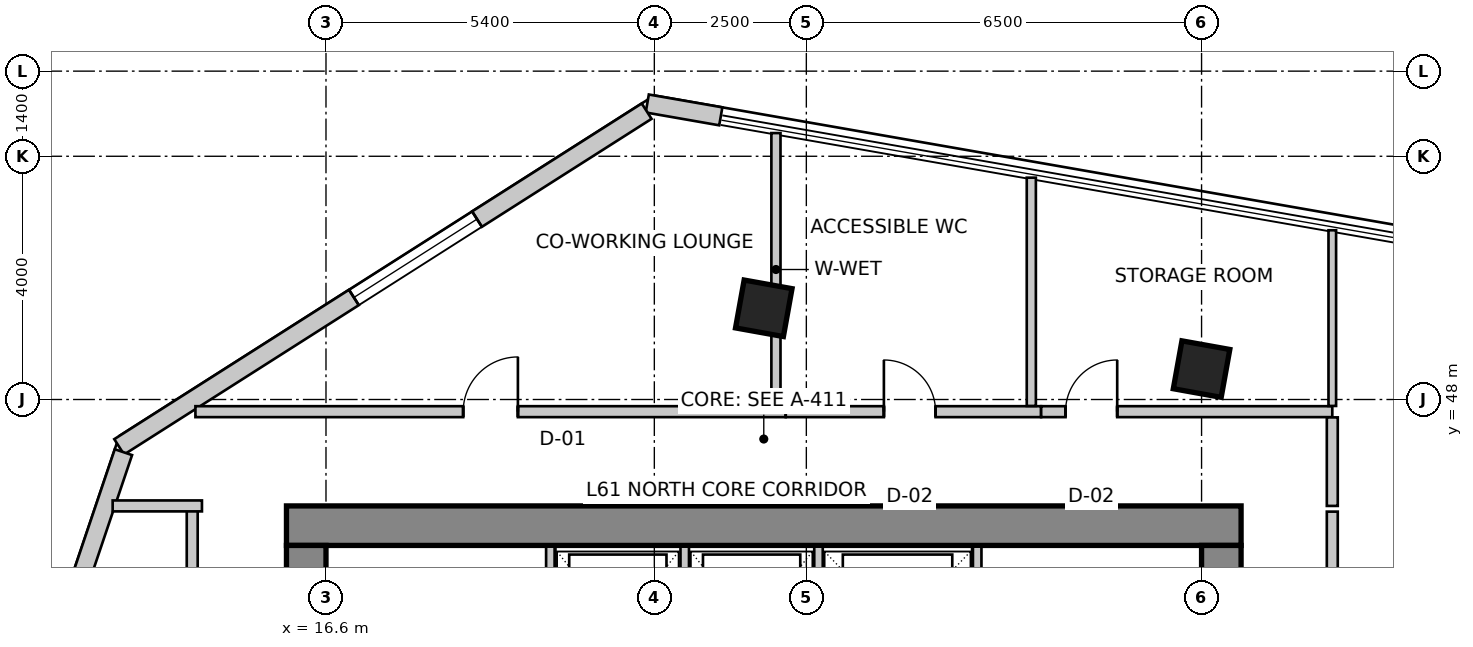
"""IFC4 building model, lengths in metres.
Left out: names, types, materials, properties, quantities, classifications, styles, units other than length and angle.
Written with IfcOpenShell. Run it as: python <this file> out.ifc"""

import sys

from ifc_helpers import new_model, si_unit, direction, frame, frame_2d, origin, origin_2d, place, context, subcontext, project, spatial, rectangle, extrude, source, transform, mapped, element, fill, save


model = new_model("IFC4")
c1 = context("Model", 3, precision=1e-05, world=origin(), true_north=direction((0.0, 1.0)))
c2 = subcontext(c1, "Body", "Model", "MODEL_VIEW")
j1 = project(units=[si_unit("LENGTHUNIT", "METRE"), si_unit("PLANEANGLEUNIT", "RADIAN")], contexts=[c1])
p1 = place(None, origin())
s1 = spatial("IfcSite", under=j1, at=p1, CompositionType="ELEMENT")
p2 = place(p1, origin())
s2 = spatial("IfcBuilding", under=s1, at=p2, CompositionType="ELEMENT")
p3 = place(p2, frame((0.0, 0.0, 239.4)))
s3 = spatial("IfcBuildingStorey", under=s2, at=p3, CompositionType="ELEMENT", Elevation=239.4)
p4 = place(p3, frame((15.95, 45.925, 0.0), z_axis=(0.0, 0.0, 1.0), x_axis=(1.0, 0.0, 0.0)))
e1 = element("IfcWall", 1, at=p4, inside=s3, PredefinedType="SHEAR", context=c2, shape_type="SweptSolid", body=[
    extrude(rectangle(XDim=15.7, YDim=0.65, at=frame_2d((7.85, 0.0))), origin(), (0.0, 0.0, 1.0), 3.5),
])
p5 = place(p3, frame((16.275, 34.2, 0.0), z_axis=(0.0, 0.0, 1.0), x_axis=(0.0, 1.0, 0.0)))
e2 = element("IfcWall", 2, at=p5, inside=s3, PredefinedType="SHEAR", context=c2, shape_type="SweptSolid", body=[
    extrude(rectangle(XDim=11.4, YDim=0.65, at=frame_2d((5.7, 0.0))), origin(), (0.0, 0.0, 1.0), 3.5),
])
m1 = source(origin(), c2, "Body", "SweptSolid", [
    extrude(rectangle(XDim=1.1, YDim=2.15, at=frame_2d((0.55, 1.075))), frame((0.0, 0.335, 0.0), z_axis=(0.0, -1.0, 0.0), x_axis=(1.0, 0.0, 0.0)), (0.0, 0.0, 1.0), 0.67),
])
p6 = place(p5, frame((7.15, 0.0, 0.0)))
e3 = element("IfcOpeningElement", 3, at=p6, cuts=e2, PredefinedType="OPENING", context=c2, shape_type="MappedRepresentation", body=[
    mapped(m1, transform((0.0, 0.0, 0.0), scale=1.0)),
])
p7 = place(p3, frame((31.325, 34.2, 0.0), z_axis=(0.0, 0.0, 1.0), x_axis=(0.0, 1.0, 0.0)))
e4 = element("IfcWall", 4, at=p7, inside=s3, PredefinedType="SHEAR", context=c2, shape_type="SweptSolid", body=[
    extrude(rectangle(XDim=11.4, YDim=0.65, at=frame_2d((5.7, 0.0))), origin(), (0.0, 0.0, 1.0), 3.5),
])
p8 = place(p7, frame((7.35, 0.0, 0.0)))
e5 = element("IfcOpeningElement", 5, at=p8, cuts=e4, PredefinedType="OPENING", context=c2, shape_type="MappedRepresentation", body=[
    mapped(m1, transform((0.0, 0.0, 0.0), scale=1.0)),
])
m2 = source(origin(), c2, "Body", "SweptSolid", [
    extrude(rectangle(XDim=0.8, YDim=0.8, at=origin_2d()), origin(), (0.0, 0.0, 1.0), 3.5),
])
for number, where, z_axis, x_axis in (
    (6, (23.8, 49.5, 0.0), (0.0, 0.0, 1.0), (0.984, -0.177, 0.0)),
    (7, (31.0, 48.5, 0.0), (0.0, 0.0, 1.0), (0.984, -0.177, 0.0)),
):
    element("IfcColumn", number, at=place(p3, frame(where, z_axis=z_axis, x_axis=x_axis)), inside=s3, PredefinedType="COLUMN", context=c2, shape_type="MappedRepresentation", body=[
        mapped(m2, transform((0.0, 0.0, 0.0), scale=1.0)),
    ])
p9 = place(p3, frame((23.093, 52.657, 0.0), z_axis=(0.0, 0.0, 1.0), x_axis=(-0.985090351288, 0.172037785961, 0.0)))
e8 = element("IfcWall", 8, at=p9, inside=s3, PredefinedType="SOLIDWALL", context=c2, shape_type="SweptSolid", body=[
    extrude(rectangle(XDim=1.228, YDim=0.3, at=frame_2d((0.614, 0.0))), origin(), (0.0, 0.0, 1.0), 3.2),
])
p10 = place(p3, frame((21.874, 52.742, 0.0), z_axis=(0.0, 0.0, 1.0), x_axis=(-0.84365659959, -0.536883173482, 0.0)))
e9 = element("IfcWall", 9, at=p10, inside=s3, PredefinedType="SOLIDWALL", context=c2, shape_type="SweptSolid", body=[
    extrude(rectangle(XDim=10.283, YDim=0.3, at=frame_2d((5.142, 0.0))), origin(), (0.0, 0.0, 1.0), 3.2),
])
m3 = source(origin(), c2, "Body", "SweptSolid", [
    extrude(rectangle(XDim=2.4, YDim=2.2, at=frame_2d((1.2, 1.1))), frame((0.0, 0.16, 0.0), z_axis=(0.0, -1.0, 0.0), x_axis=(1.0, 0.0, 0.0)), (0.0, 0.0, 1.0), 0.32),
])
p11 = place(p10, frame((3.307, 0.0, 0.85)))
e10 = element("IfcOpeningElement", 10, at=p11, cuts=e9, PredefinedType="OPENING", context=c2, shape_type="MappedRepresentation", body=[
    mapped(m3, transform((0.0, 0.0, 0.0), scale=1.0)),
])
p12 = place(p3, frame((13.269, 47.134, 0.0), z_axis=(0.0, 0.0, 1.0), x_axis=(-0.319920776449, -0.947444297464, 0.0)))
e11 = element("IfcWall", 11, at=p12, inside=s3, PredefinedType="SOLIDWALL", context=c2, shape_type="SweptSolid", body=[
    extrude(rectangle(XDim=16.133, YDim=0.3, at=frame_2d((8.067, 0.0))), origin(), (0.0, 0.0, 1.0), 3.2),
])
m4 = source(origin(), c2, "Body", "SweptSolid", [
    extrude(rectangle(XDim=2.1, YDim=2.0, at=frame_2d((1.05, 1.0))), frame((0.0, 0.16, 0.0), z_axis=(0.0, -1.0, 0.0), x_axis=(1.0, 0.0, 0.0)), (0.0, 0.0, 1.0), 0.32),
])
p13 = place(p12, frame((2.513, 0.0, 0.85)))
e12 = element("IfcOpeningElement", 12, at=p13, cuts=e11, PredefinedType="OPENING", context=c2, shape_type="MappedRepresentation", body=[
    mapped(m4, transform((0.0, 0.0, 0.0), scale=1.0)),
])
p14 = place(p12, frame((7.26, 0.0, 0.85)))
e13 = element("IfcOpeningElement", 13, at=p14, cuts=e11, PredefinedType="OPENING", context=c2, shape_type="MappedRepresentation", body=[
    mapped(m3, transform((0.0, 0.0, 0.0), scale=1.0)),
])
p15 = place(p12, frame((12.307, 0.0, 0.85)))
e14 = element("IfcOpeningElement", 14, at=p15, cuts=e11, PredefinedType="OPENING", context=c2, shape_type="MappedRepresentation", body=[
    mapped(m4, transform((0.0, 0.0, 0.0), scale=1.0)),
])
for number, where, z_axis, x_axis in (
    (15, (20.29, 43.28, 0.0), (0.0, 0.0, 1.0), (0.0, 1.0, 0.0)),
    (16, (27.31, 43.28, 0.0), (0.0, 0.0, 1.0), (0.0, 1.0, 0.0)),
):
    element("IfcWall", number, at=place(p3, frame(where, z_axis=z_axis, x_axis=x_axis)), inside=s3, PredefinedType="SOLIDWALL", context=c2, shape_type="SweptSolid", body=[
        extrude(rectangle(XDim=2.3, YDim=0.14, at=frame_2d((1.15, 0.0))), origin(), (0.0, 0.0, 1.0), 3.2),
    ])
for number, where, z_axis, x_axis in (
    (17, (22.5, 43.02, 0.0), (0.0, 0.0, 1.0), (0.0, 1.0, 0.0)),
    (18, (24.7, 43.02, 0.0), (0.0, 0.0, 1.0), (0.0, 1.0, 0.0)),
):
    element("IfcWall", number, at=place(p3, frame(where, z_axis=z_axis, x_axis=x_axis)), inside=s3, PredefinedType="SOLIDWALL", context=c2, shape_type="SweptSolid", body=[
        extrude(rectangle(XDim=2.56, YDim=0.14, at=frame_2d((1.28, 0.0))), origin(), (0.0, 0.0, 1.0), 3.2),
    ])
p16 = place(p3, frame((14.4, 33.644, 0.0), z_axis=(0.0, 0.0, 1.0), x_axis=(0.0, 1.0, 0.0)))
e19 = element("IfcWall", 19, at=p16, inside=s3, PredefinedType="PARTITIONING", context=c2, shape_type="SweptSolid", body=[
    extrude(rectangle(XDim=12.606, YDim=0.18, at=frame_2d((6.303, 0.0))), origin(), (0.0, 0.0, 1.0), 3.2),
])
m5 = source(origin(), c2, "Body", "SweptSolid", [
    extrude(rectangle(XDim=0.9, YDim=2.15, at=frame_2d((0.45, 1.075))), frame((0.0, 0.1, 0.0), z_axis=(0.0, -1.0, 0.0), x_axis=(1.0, 0.0, 0.0)), (0.0, 0.0, 1.0), 0.2),
])
p17 = place(p16, frame((4.399, 0.0, 0.0)))
e20 = element("IfcOpeningElement", 20, at=p17, cuts=e19, PredefinedType="OPENING", context=c2, shape_type="MappedRepresentation", body=[
    mapped(m5, transform((0.0, 0.0, 0.0), scale=1.0)),
])
p18 = place(p3, frame((14.56, 46.25, 0.0), z_axis=(0.0, 0.0, 1.0), x_axis=(-1.0, 0.0, 0.0)))
e21 = element("IfcWall", 21, at=p18, inside=s3, PredefinedType="PARTITIONING", context=c2, shape_type="SweptSolid", body=[
    extrude(rectangle(XDim=1.469, YDim=0.18, at=frame_2d((0.734, 0.0))), origin(), (0.0, 0.0, 1.0), 3.2),
])
p19 = place(p3, frame((14.453, 47.8, 0.0), z_axis=(0.0, 0.0, 1.0), x_axis=(1.0, 0.0, 0.0)))
e22 = element("IfcWall", 22, at=p19, inside=s3, PredefinedType="PARTITIONING", context=c2, shape_type="SweptSolid", body=[
    extrude(rectangle(XDim=9.707, YDim=0.18, at=frame_2d((4.854, 0.0))), origin(), (0.0, 0.0, 1.0), 2.869),
])
p20 = place(p19, frame((4.404, 0.0, 0.0)))
e23 = element("IfcOpeningElement", 23, at=p20, cuts=e22, PredefinedType="OPENING", context=c2, shape_type="MappedRepresentation", body=[
    mapped(m5, transform((0.0, 0.0, 0.0), scale=1.0)),
])
p21 = place(p3, frame((24.162, 47.8, 0.0), z_axis=(0.0, 0.0, 1.0), x_axis=(1.0, 0.0, 0.0)))
e24 = element("IfcWall", 24, at=p21, inside=s3, PredefinedType="PARTITIONING", context=c2, shape_type="SweptSolid", body=[
    extrude(rectangle(XDim=4.198, YDim=0.18, at=frame_2d((2.099, 0.0))), origin(), (0.0, 0.0, 1.0), 3.2),
])
m6 = source(origin(), c2, "Body", "SweptSolid", [
    extrude(rectangle(XDim=0.85, YDim=2.15, at=frame_2d((0.425, 1.075))), frame((0.0, 0.1, 0.0), z_axis=(0.0, -1.0, 0.0), x_axis=(1.0, 0.0, 0.0)), (0.0, 0.0, 1.0), 0.2),
])
p22 = place(p21, frame((1.613, 0.0, 0.0)))
e25 = element("IfcOpeningElement", 25, at=p22, cuts=e24, PredefinedType="OPENING", context=c2, shape_type="MappedRepresentation", body=[
    mapped(m6, transform((0.0, 0.0, 0.0), scale=1.0)),
])
p23 = place(p3, frame((28.362, 47.8, 0.0), z_axis=(0.0, 0.0, 1.0), x_axis=(1.0, 0.0, 0.0)))
e26 = element("IfcWall", 26, at=p23, inside=s3, PredefinedType="PARTITIONING", context=c2, shape_type="SweptSolid", body=[
    extrude(rectangle(XDim=4.788, YDim=0.18, at=frame_2d((2.394, 0.0))), origin(), (0.0, 0.0, 1.0), 2.729),
])
p24 = place(p23, frame((0.401, 0.0, 0.0)))
e27 = element("IfcOpeningElement", 27, at=p24, cuts=e26, PredefinedType="OPENING", context=c2, shape_type="MappedRepresentation", body=[
    mapped(m6, transform((0.0, 0.0, 0.0), scale=1.0)),
])
p25 = place(p3, frame((33.15, 47.706, 0.0), z_axis=(0.0, 0.0, 1.0), x_axis=(0.0, -1.0, 0.0)))
e28 = element("IfcWall", 28, at=p25, inside=s3, PredefinedType="PARTITIONING", context=c2, shape_type="SweptSolid", body=[
    extrude(rectangle(XDim=1.456, YDim=0.18, at=frame_2d((0.728, 0.0))), origin(), (0.0, 0.0, 1.0), 2.869),
])
p26 = place(p3, frame((33.15, 46.156, 0.0), z_axis=(0.0, 0.0, 1.0), x_axis=(0.0, -1.0, 0.0)))
e29 = element("IfcWall", 29, at=p26, inside=s3, PredefinedType="PARTITIONING", context=c2, shape_type="SweptSolid", body=[
    extrude(rectangle(XDim=6.316, YDim=0.18, at=frame_2d((3.158, 0.0))), origin(), (0.0, 0.0, 1.0), 2.729),
])
p27 = place(p3, frame((24.0, 52.382, 0.0), z_axis=(0.0, 0.0, 1.0), x_axis=(0.0, -1.0, 0.0)))
e30 = element("IfcWall", 30, at=p27, inside=s3, PredefinedType="PARTITIONING", context=c2, shape_type="SweptSolid", body=[
    extrude(rectangle(XDim=4.488, YDim=0.15, at=frame_2d((2.244, 0.0))), origin(), (0.0, 0.0, 1.0), 2.492),
])
p28 = place(p3, frame((28.2, 51.648, 0.0), z_axis=(0.0, 0.0, 1.0), x_axis=(0.0, -1.0, 0.0)))
e31 = element("IfcWall", 31, at=p28, inside=s3, PredefinedType="PARTITIONING", context=c2, shape_type="SweptSolid", body=[
    extrude(rectangle(XDim=3.754, YDim=0.15, at=frame_2d((1.877, 0.0))), origin(), (0.0, 0.0, 1.0), 2.492),
])
p29 = place(p3, frame((33.15, 50.783, 0.0), z_axis=(0.0, 0.0, 1.0), x_axis=(0.0, -1.0, 0.0)))
e32 = element("IfcWall", 32, at=p29, inside=s3, PredefinedType="PARTITIONING", context=c2, shape_type="SweptSolid", body=[
    extrude(rectangle(XDim=2.889, YDim=0.125, at=frame_2d((1.445, 0.0))), origin(), (0.0, 0.0, 1.0), 2.492),
])
m7 = source(origin(), c2, "Body", "SweptSolid", [
    extrude(rectangle(XDim=2.4, YDim=2.2, at=frame_2d((1.2, 1.1))), frame((0.0, -0.015, 0.0), z_axis=(0.0, -1.0, 0.0), x_axis=(1.0, 0.0, 0.0)), (0.0, 0.0, 1.0), 0.06),
])
p30 = place(p11, origin())
e33 = element("IfcWindow", 33, at=p30, inside=s3, PartitioningType="SINGLE_PANEL", PredefinedType="WINDOW", context=c2, shape_type="MappedRepresentation", body=[
    mapped(m7, transform((0.0, 0.0, 0.0), scale=1.0)),
])
fill(e10, e33)
m8 = source(origin(), c2, "Body", "SweptSolid", [
    extrude(rectangle(XDim=0.9, YDim=2.15, at=frame_2d((0.45, 1.075))), frame((0.0, 0.025, 0.0), z_axis=(0.0, -1.0, 0.0), x_axis=(1.0, 0.0, 0.0)), (0.0, 0.0, 1.0), 0.05),
])
p31 = place(p20, origin())
e34 = element("IfcDoor", 34, at=p31, inside=s3, OperationType="SINGLE_SWING_RIGHT", PredefinedType="DOOR", context=c2, shape_type="MappedRepresentation", body=[
    mapped(m8, transform((0.0, 0.0, 0.0), scale=1.0)),
])
fill(e23, e34)
m9 = source(origin(), c2, "Body", "SweptSolid", [
    extrude(rectangle(XDim=0.85, YDim=2.15, at=frame_2d((0.425, 1.075))), frame((0.0, 0.025, 0.0), z_axis=(0.0, -1.0, 0.0), x_axis=(1.0, 0.0, 0.0)), (0.0, 0.0, 1.0), 0.05),
])
p32 = place(p22, origin())
e35 = element("IfcDoor", 35, at=p32, inside=s3, OperationType="SINGLE_SWING_LEFT", PredefinedType="DOOR", context=c2, shape_type="MappedRepresentation", body=[
    mapped(m9, transform((0.0, 0.0, 0.0), scale=1.0)),
])
fill(e25, e35)
p33 = place(p24, origin())
e36 = element("IfcDoor", 36, at=p33, inside=s3, OperationType="SINGLE_SWING_RIGHT", PredefinedType="DOOR", context=c2, shape_type="MappedRepresentation", body=[
    mapped(m9, transform((0.0, 0.0, 0.0), scale=1.0)),
])
fill(e27, e36)
save(model, sys.argv[1])
